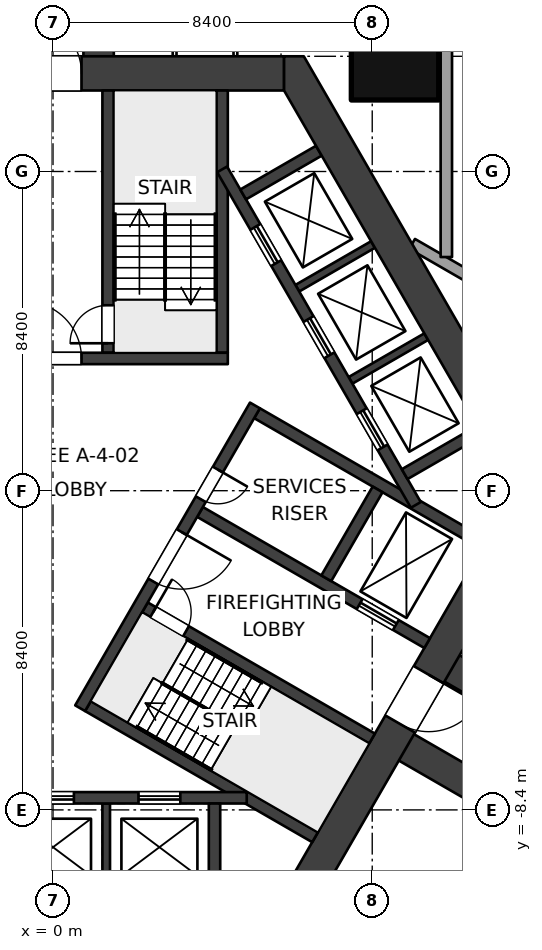
"""IFC4 building model, lengths in metres.
Left out: names, types, materials, properties, quantities, classifications, styles, units other than length and angle.
Written with IfcOpenShell. Run it as: python <this file> out.ifc"""

import sys

from ifc_helpers import new_model, si_unit, direction, frame, frame_2d, origin, origin_2d, place, context, subcontext, project, spatial, polyline, rectangle, outline, extrude, element, fill, save


model = new_model("IFC4")
c1 = context("Model", 3, precision=1e-05, world=origin(), true_north=direction((0.0, 1.0)))
c2 = subcontext(c1, "Body", "Model", "MODEL_VIEW")
j1 = project(units=[si_unit("LENGTHUNIT", "METRE"), si_unit("PLANEANGLEUNIT", "RADIAN")], contexts=[c1])
p1 = place(None, origin())
s1 = spatial("IfcSite", under=j1, at=p1, CompositionType="ELEMENT")
p2 = place(p1, origin())
s2 = spatial("IfcBuilding", under=s1, at=p2, CompositionType="ELEMENT")
p3 = place(p2, origin())
s3 = spatial("IfcBuildingStorey", under=s2, at=p3, CompositionType="ELEMENT", Elevation=0.0)
p4 = place(p3, frame((9.0, 11.432, 0.0), z_axis=(0.0, 0.0, 1.0), x_axis=(1.0, 0.0, 0.0)))
e1 = element("IfcColumn", 1, at=p4, inside=s3, PredefinedType="COLUMN", context=c2, shape_type="SweptSolid", body=[
    extrude(rectangle(XDim=2.3, YDim=2.3, at=origin_2d()), origin(), (0.0, 0.0, 1.0), 6.0),
])
p5 = place(p3, frame((-6.08, 10.981, 0.0), z_axis=(0.0, 0.0, 1.0), x_axis=(1.0, 0.0, 0.0)))
e2 = element("IfcWall", 2, at=p5, inside=s3, PredefinedType="SHEAR", context=c2, shape_type="SweptSolid", body=[
    extrude(rectangle(XDim=12.161, YDim=0.9, at=frame_2d((6.08, 0.0))), origin(), (0.0, 0.0, 1.0), 6.0),
])
p6 = place(p5, frame((5.33, 0.0, 0.0)))
e3 = element("IfcOpeningElement", 3, at=p6, cuts=e2, PredefinedType="OPENING", context=c2, shape_type="SweptSolid", body=[
    extrude(rectangle(XDim=1.5, YDim=2.1, at=frame_2d((0.75, 1.05))), frame((0.0, 0.46, 0.0), z_axis=(0.0, -1.0, 0.0), x_axis=(1.0, 0.0, 0.0)), (0.0, 0.0, 1.0), 0.92),
])
p7 = place(p3, frame((12.551, -0.225, 0.0), z_axis=(0.0, 0.0, 1.0), x_axis=(-0.499997612506, -0.8660267822, 0.0)))
e4 = element("IfcWall", 4, at=p7, inside=s3, PredefinedType="SHEAR", context=c2, shape_type="SweptSolid", body=[
    extrude(rectangle(XDim=12.161, YDim=0.9, at=frame_2d((6.08, 0.0))), origin(), (0.0, 0.0, 1.0), 6.0),
])
p8 = place(p7, frame((5.33, 0.0, 0.0)))
e5 = element("IfcOpeningElement", 5, at=p8, cuts=e4, PredefinedType="OPENING", context=c2, shape_type="SweptSolid", body=[
    extrude(rectangle(XDim=1.5, YDim=2.1, at=frame_2d((0.75, 1.05))), frame((0.0, 0.46, 0.0), z_axis=(0.0, -1.0, 0.0), x_axis=(1.0, 0.0, 0.0)), (0.0, 0.0, 1.0), 0.92),
])
p9 = place(p3, origin())
e6 = element("IfcWall", 6, at=p9, inside=s3, PredefinedType="SHEAR", context=c2, shape_type="SweptSolid", body=[
    extrude(outline(polyline([(13.2, 0.0), (6.6, 11.432), (6.08, 11.432), (6.08, 10.531), (12.161, 0.0), (12.94, -0.45), (13.2, 0.0)])), origin(), (0.0, 0.0, 1.0), 6.0),
])
p10 = place(p3, frame((-4.6, 3.48, 0.0), z_axis=(0.0, 0.0, 1.0), x_axis=(1.0, 0.0, 0.0)))
e7 = element("IfcWall", 7, at=p10, inside=s3, PredefinedType="SHEAR", context=c2, shape_type="SweptSolid", body=[
    extrude(rectangle(XDim=9.2, YDim=0.3, at=frame_2d((4.6, 0.0))), origin(), (0.0, 0.0, 1.0), 6.0),
])
p11 = place(p10, frame((3.85, 0.0, 0.0)))
e8 = element("IfcOpeningElement", 8, at=p11, cuts=e7, PredefinedType="OPENING", context=c2, shape_type="SweptSolid", body=[
    extrude(rectangle(XDim=1.5, YDim=2.1, at=frame_2d((0.75, 1.05))), frame((0.0, 0.16, 0.0), z_axis=(0.0, -1.0, 0.0), x_axis=(1.0, 0.0, 0.0)), (0.0, 0.0, 1.0), 0.32),
])
p12 = place(p10, frame((1.95, 0.0, 0.0)))
e9 = element("IfcOpeningElement", 9, at=p12, cuts=e7, PredefinedType="OPENING", context=c2, shape_type="SweptSolid", body=[
    extrude(rectangle(XDim=0.9, YDim=2.1, at=frame_2d((0.45, 1.05))), frame((0.0, 0.16, 0.0), z_axis=(0.0, -1.0, 0.0), x_axis=(1.0, 0.0, 0.0)), (0.0, 0.0, 1.0), 0.32),
])
p13 = place(p3, frame((1.45, 3.63, 0.0), z_axis=(0.0, 0.0, 1.0), x_axis=(0.0, 1.0, 0.0)))
e10 = element("IfcWall", 10, at=p13, inside=s3, PredefinedType="SHEAR", context=c2, shape_type="SweptSolid", body=[
    extrude(rectangle(XDim=6.902, YDim=0.3, at=frame_2d((3.451, 0.0))), origin(), (0.0, 0.0, 1.0), 6.0),
])
p14 = place(p13, frame((0.25, 0.0, 0.0)))
e11 = element("IfcOpeningElement", 11, at=p14, cuts=e10, PredefinedType="OPENING", context=c2, shape_type="SweptSolid", body=[
    extrude(rectangle(XDim=1.0, YDim=2.1, at=frame_2d((0.5, 1.05))), frame((0.0, 0.16, 0.0), z_axis=(0.0, -1.0, 0.0), x_axis=(1.0, 0.0, 0.0)), (0.0, 0.0, 1.0), 0.32),
])
p15 = place(p3, frame((4.45, 3.63, 0.0), z_axis=(0.0, 0.0, 1.0), x_axis=(0.0, 1.0, 0.0)))
e12 = element("IfcWall", 12, at=p15, inside=s3, PredefinedType="SHEAR", context=c2, shape_type="SweptSolid", body=[
    extrude(rectangle(XDim=6.902, YDim=0.3, at=frame_2d((3.451, 0.0))), origin(), (0.0, 0.0, 1.0), 6.0),
])
p16 = place(p3, frame((5.314, 2.244, 0.0), z_axis=(0.0, 0.0, 1.0), x_axis=(-0.499995050369, -0.866028261437, 0.0)))
e13 = element("IfcWall", 13, at=p16, inside=s3, PredefinedType="SHEAR", context=c2, shape_type="SweptSolid", body=[
    extrude(rectangle(XDim=9.2, YDim=0.3, at=frame_2d((4.6, 0.0))), origin(), (0.0, 0.0, 1.0), 6.0),
])
p17 = place(p16, frame((3.85, 0.0, 0.0)))
e14 = element("IfcOpeningElement", 14, at=p17, cuts=e13, PredefinedType="OPENING", context=c2, shape_type="SweptSolid", body=[
    extrude(rectangle(XDim=1.5, YDim=2.1, at=frame_2d((0.75, 1.05))), frame((0.0, 0.16, 0.0), z_axis=(0.0, -1.0, 0.0), x_axis=(1.0, 0.0, 0.0)), (0.0, 0.0, 1.0), 0.32),
])
p18 = place(p16, frame((1.95, 0.0, 0.0)))
e15 = element("IfcOpeningElement", 15, at=p18, cuts=e13, PredefinedType="OPENING", context=c2, shape_type="SweptSolid", body=[
    extrude(rectangle(XDim=0.9, YDim=2.1, at=frame_2d((0.45, 1.05))), frame((0.0, 0.16, 0.0), z_axis=(0.0, -1.0, 0.0), x_axis=(1.0, 0.0, 0.0)), (0.0, 0.0, 1.0), 0.32),
])
p19 = place(p3, frame((2.419, -3.071, 0.0), z_axis=(0.0, 0.0, 1.0), x_axis=(0.86602711848, -0.499997030048, 0.0)))
e16 = element("IfcWall", 16, at=p19, inside=s3, PredefinedType="SHEAR", context=c2, shape_type="SweptSolid", body=[
    extrude(rectangle(XDim=6.901, YDim=0.3, at=frame_2d((3.451, 0.0))), origin(), (0.0, 0.0, 1.0), 6.0),
])
p20 = place(p19, frame((0.25, 0.0, 0.0)))
e17 = element("IfcOpeningElement", 17, at=p20, cuts=e16, PredefinedType="OPENING", context=c2, shape_type="SweptSolid", body=[
    extrude(rectangle(XDim=1.0, YDim=2.1, at=frame_2d((0.5, 1.05))), frame((0.0, 0.16, 0.0), z_axis=(0.0, -1.0, 0.0), x_axis=(1.0, 0.0, 0.0)), (0.0, 0.0, 1.0), 0.32),
])
p21 = place(p3, frame((0.919, -5.669, 0.0), z_axis=(0.0, 0.0, 1.0), x_axis=(0.866011800373, -0.500023561059, 0.0)))
e18 = element("IfcWall", 18, at=p21, inside=s3, PredefinedType="SHEAR", context=c2, shape_type="SweptSolid", body=[
    extrude(rectangle(XDim=6.902, YDim=0.3, at=frame_2d((3.451, 0.0))), origin(), (0.0, 0.0, 1.0), 6.0),
])
p22 = place(p3, frame((3.869, -0.559, 0.0), z_axis=(0.0, 0.0, 1.0), x_axis=(0.86602711848, -0.499997030048, 0.0)))
e19 = element("IfcWall", 19, at=p22, inside=s3, PredefinedType="SHEAR", context=c2, shape_type="SweptSolid", body=[
    extrude(rectangle(XDim=6.901, YDim=0.3, at=frame_2d((3.451, 0.0))), origin(), (0.0, 0.0, 1.0), 6.0),
])
p23 = place(p22, frame((4.85, 0.0, 0.0)))
e20 = element("IfcOpeningElement", 20, at=p23, cuts=e19, PredefinedType="OPENING", context=c2, shape_type="SweptSolid", body=[
    extrude(rectangle(XDim=1.1, YDim=2.1, at=frame_2d((0.55, 1.05))), frame((0.0, 0.16, 0.0), z_axis=(0.0, -1.0, 0.0), x_axis=(1.0, 0.0, 0.0)), (0.0, 0.0, 1.0), 0.32),
])
p24 = place(p3, frame((5.369, 2.039, 0.0), z_axis=(0.0, 0.0, 1.0), x_axis=(0.86602711848, -0.499997030048, 0.0)))
e21 = element("IfcWall", 21, at=p24, inside=s3, PredefinedType="SHEAR", context=c2, shape_type="SweptSolid", body=[
    extrude(rectangle(XDim=6.901, YDim=0.3, at=frame_2d((3.451, 0.0))), origin(), (0.0, 0.0, 1.0), 6.0),
])
p25 = place(p3, frame((8.541, 0.034, 0.0), z_axis=(0.0, 0.0, 1.0), x_axis=(-0.50000943426, -0.866019956843, 0.0)))
e22 = element("IfcWall", 22, at=p25, inside=s3, PredefinedType="SHEAR", context=c2, shape_type="SweptSolid", body=[
    extrude(rectangle(XDim=2.7, YDim=0.3, at=frame_2d((1.35, 0.0))), origin(), (0.0, 0.0, 1.0), 6.0),
])
p26 = place(p3, frame((5.098, -8.082, 0.0), z_axis=(0.0, 0.0, 1.0), x_axis=(-1.0, 0.0, 0.0)))
e23 = element("IfcWall", 23, at=p26, inside=s3, PredefinedType="SHEAR", context=c2, shape_type="SweptSolid", body=[
    extrude(rectangle(XDim=10.195, YDim=0.3, at=frame_2d((5.098, 0.0))), origin(), (0.0, 0.0, 1.0), 6.0),
])
p27 = place(p26, frame((1.748, 0.0, 0.0)))
e24 = element("IfcOpeningElement", 24, at=p27, cuts=e23, PredefinedType="OPENING", context=c2, shape_type="SweptSolid", body=[
    extrude(rectangle(XDim=1.1, YDim=2.1, at=frame_2d((0.55, 1.05))), frame((0.0, 0.16, 0.0), z_axis=(0.0, -1.0, 0.0), x_axis=(1.0, 0.0, 0.0)), (0.0, 0.0, 1.0), 0.32),
])
p28 = place(p26, frame((4.548, 0.0, 0.0)))
e25 = element("IfcOpeningElement", 25, at=p28, cuts=e23, PredefinedType="OPENING", context=c2, shape_type="SweptSolid", body=[
    extrude(rectangle(XDim=1.1, YDim=2.1, at=frame_2d((0.55, 1.05))), frame((0.0, 0.16, 0.0), z_axis=(0.0, -1.0, 0.0), x_axis=(1.0, 0.0, 0.0)), (0.0, 0.0, 1.0), 0.32),
])
p29 = place(p26, frame((7.348, 0.0, 0.0)))
e26 = element("IfcOpeningElement", 26, at=p29, cuts=e23, PredefinedType="OPENING", context=c2, shape_type="SweptSolid", body=[
    extrude(rectangle(XDim=1.1, YDim=2.1, at=frame_2d((0.55, 1.05))), frame((0.0, 0.16, 0.0), z_axis=(0.0, -1.0, 0.0), x_axis=(1.0, 0.0, 0.0)), (0.0, 0.0, 1.0), 0.32),
])
p30 = place(p3, frame((4.25, -8.231, 0.0), z_axis=(0.0, 0.0, 1.0), x_axis=(0.0, -1.0, 0.0)))
e27 = element("IfcWall", 27, at=p30, inside=s3, PredefinedType="SHEAR", context=c2, shape_type="SweptSolid", body=[
    extrude(rectangle(XDim=2.3, YDim=0.3, at=frame_2d((1.15, 0.0))), origin(), (0.0, 0.0, 1.0), 6.0),
])
p31 = place(p3, frame((1.4, -8.231, 0.0), z_axis=(0.0, 0.0, 1.0), x_axis=(0.0, -1.0, 0.0)))
e28 = element("IfcWall", 28, at=p31, inside=s3, PredefinedType="SHEAR", context=c2, shape_type="SweptSolid", body=[
    extrude(rectangle(XDim=2.3, YDim=0.2, at=frame_2d((1.15, 0.0))), origin(), (0.0, 0.0, 1.0), 6.0),
])
p32 = place(p3, frame((4.45, 8.455, 0.0), z_axis=(0.0, 0.0, 1.0), x_axis=(0.500002290144, -0.866024081565, 0.0)))
e29 = element("IfcWall", 29, at=p32, inside=s3, PredefinedType="SHEAR", context=c2, shape_type="SweptSolid", body=[
    extrude(rectangle(XDim=10.195, YDim=0.3, at=frame_2d((5.098, 0.0))), origin(), (0.0, 0.0, 1.0), 6.0),
])
p33 = place(p32, frame((1.748, 0.0, 0.0)))
e30 = element("IfcOpeningElement", 30, at=p33, cuts=e29, PredefinedType="OPENING", context=c2, shape_type="SweptSolid", body=[
    extrude(rectangle(XDim=1.1, YDim=2.1, at=frame_2d((0.55, 1.05))), frame((0.0, 0.16, 0.0), z_axis=(0.0, -1.0, 0.0), x_axis=(1.0, 0.0, 0.0)), (0.0, 0.0, 1.0), 0.32),
])
p34 = place(p32, frame((4.548, 0.0, 0.0)))
e31 = element("IfcOpeningElement", 31, at=p34, cuts=e29, PredefinedType="OPENING", context=c2, shape_type="SweptSolid", body=[
    extrude(rectangle(XDim=1.1, YDim=2.1, at=frame_2d((0.55, 1.05))), frame((0.0, 0.16, 0.0), z_axis=(0.0, -1.0, 0.0), x_axis=(1.0, 0.0, 0.0)), (0.0, 0.0, 1.0), 0.32),
])
p35 = place(p32, frame((7.348, 0.0, 0.0)))
e32 = element("IfcOpeningElement", 32, at=p35, cuts=e29, PredefinedType="OPENING", context=c2, shape_type="SweptSolid", body=[
    extrude(rectangle(XDim=1.1, YDim=2.1, at=frame_2d((0.55, 1.05))), frame((0.0, 0.16, 0.0), z_axis=(0.0, -1.0, 0.0), x_axis=(1.0, 0.0, 0.0)), (0.0, 0.0, 1.0), 0.32),
])
for number, where, z_axis, x_axis in (
    (33, (5.004, 7.796, 0.0), (0.0, 0.0, 1.0), (0.866, 0.5, 0.0)),
    (34, (9.254, 0.435, 0.0), (0.0, 0.0, 1.0), (0.866, 0.5, 0.0)),
):
    element("IfcWall", number, at=place(p3, frame(where, z_axis=z_axis, x_axis=x_axis)), inside=s3, PredefinedType="SHEAR", context=c2, shape_type="SweptSolid", body=[
        extrude(rectangle(XDim=2.3, YDim=0.3, at=frame_2d((1.15, 0.0))), origin(), (0.0, 0.0, 1.0), 6.0),
    ])
for number, where, z_axis, x_axis in (
    (35, (6.429, 5.328, 0.0), (0.0, 0.0, 1.0), (0.866, 0.5, 0.0)),
    (36, (7.829, 2.903, 0.0), (0.0, 0.0, 1.0), (0.866, 0.5, 0.0)),
):
    element("IfcWall", number, at=place(p3, frame(where, z_axis=z_axis, x_axis=x_axis)), inside=s3, PredefinedType="SHEAR", context=c2, shape_type="SweptSolid", body=[
        extrude(rectangle(XDim=2.3, YDim=0.2, at=frame_2d((1.15, 0.0))), origin(), (0.0, 0.0, 1.0), 6.0),
    ])
p36 = place(p3, frame((1.2, 10.981, 0.0), z_axis=(0.0, 0.0, 1.0), x_axis=(0.0, 1.0, 0.0)))
e37 = element("IfcWall", 37, at=p36, inside=s3, PredefinedType="SHEAR", context=c2, shape_type="SweptSolid", body=[
    extrude(rectangle(XDim=36.75, YDim=0.8, at=frame_2d((18.375, 0.0))), origin(), (0.0, 0.0, 1.0), 6.0),
])
p37 = place(p36, frame((10.0, 0.0, 0.0)))
e38 = element("IfcOpeningElement", 38, at=p37, cuts=e37, PredefinedType="OPENING", context=c2, shape_type="SweptSolid", body=[
    extrude(rectangle(XDim=1.0, YDim=2.1, at=frame_2d((0.5, 1.05))), frame((0.0, 0.41, 0.0), z_axis=(0.0, -1.0, 0.0), x_axis=(1.0, 0.0, 0.0)), (0.0, 0.0, 1.0), 0.82),
])
p38 = place(p36, frame((2.75, 0.0, 0.0)))
e39 = element("IfcOpeningElement", 39, at=p38, cuts=e37, PredefinedType="OPENING", context=c2, shape_type="SweptSolid", body=[
    extrude(rectangle(XDim=1.2, YDim=2.1, at=frame_2d((0.6, 1.05))), frame((0.0, 0.41, 0.0), z_axis=(0.0, -1.0, 0.0), x_axis=(1.0, 0.0, 0.0)), (0.0, 0.0, 1.0), 0.82),
])
p39 = place(p36, frame((7.35, 0.0, 0.0)))
e40 = element("IfcOpeningElement", 40, at=p39, cuts=e37, PredefinedType="OPENING", context=c2, shape_type="SweptSolid", body=[
    extrude(rectangle(XDim=1.2, YDim=2.1, at=frame_2d((0.6, 1.05))), frame((0.0, 0.41, 0.0), z_axis=(0.0, -1.0, 0.0), x_axis=(1.0, 0.0, 0.0)), (0.0, 0.0, 1.0), 0.82),
])
p40 = place(p3, frame((10.11, -4.451, 0.0), z_axis=(0.0, 0.0, 1.0), x_axis=(0.866025284237, -0.500000207062, 0.0)))
e41 = element("IfcWall", 41, at=p40, inside=s3, PredefinedType="SHEAR", context=c2, shape_type="SweptSolid", body=[
    extrude(rectangle(XDim=36.75, YDim=0.8, at=frame_2d((18.375, 0.0))), origin(), (0.0, 0.0, 1.0), 6.0),
])
p41 = place(p40, frame((2.85, 0.0, 0.0)))
e42 = element("IfcOpeningElement", 42, at=p41, cuts=e41, PredefinedType="OPENING", context=c2, shape_type="SweptSolid", body=[
    extrude(rectangle(XDim=1.2, YDim=2.1, at=frame_2d((0.6, 1.05))), frame((0.0, 0.41, 0.0), z_axis=(0.0, -1.0, 0.0), x_axis=(1.0, 0.0, 0.0)), (0.0, 0.0, 1.0), 0.82),
])
p42 = place(p3, frame((8.91, -6.53, 0.0), z_axis=(0.0, 0.0, 1.0), x_axis=(0.866025284237, -0.500000207062, 0.0)))
e43 = element("IfcWall", 43, at=p42, inside=s3, PredefinedType="SHEAR", context=c2, shape_type="SweptSolid", body=[
    extrude(rectangle(XDim=36.75, YDim=0.8, at=frame_2d((18.375, 0.0))), origin(), (0.0, 0.0, 1.0), 6.0),
])
p43 = place(p42, frame((10.0, 0.0, 0.0)))
e44 = element("IfcOpeningElement", 44, at=p43, cuts=e43, PredefinedType="OPENING", context=c2, shape_type="SweptSolid", body=[
    extrude(rectangle(XDim=1.0, YDim=2.1, at=frame_2d((0.5, 1.05))), frame((0.0, 0.41, 0.0), z_axis=(0.0, -1.0, 0.0), x_axis=(1.0, 0.0, 0.0)), (0.0, 0.0, 1.0), 0.82),
])
p44 = place(p42, frame((2.85, 0.0, 0.0)))
e45 = element("IfcOpeningElement", 45, at=p44, cuts=e43, PredefinedType="OPENING", context=c2, shape_type="SweptSolid", body=[
    extrude(rectangle(XDim=1.2, YDim=2.1, at=frame_2d((0.6, 1.05))), frame((0.0, 0.41, 0.0), z_axis=(0.0, -1.0, 0.0), x_axis=(1.0, 0.0, 0.0)), (0.0, 0.0, 1.0), 0.82),
])
p45 = place(p3, frame((3.2, 11.432, 0.0), z_axis=(0.0, 0.0, 1.0), x_axis=(0.0, 1.0, 0.0)))
e46 = element("IfcWall", 46, at=p45, inside=s3, PredefinedType="PARTITIONING", context=c2, shape_type="SweptSolid", body=[
    extrude(rectangle(XDim=5.6, YDim=0.1, at=frame_2d((2.8, 0.0))), origin(), (0.0, 0.0, 1.0), 5.7),
])
p46 = place(p45, frame((1.125, 0.0, 0.0)))
e47 = element("IfcOpeningElement", 47, at=p46, cuts=e46, PredefinedType="OPENING", context=c2, shape_type="SweptSolid", body=[
    extrude(rectangle(XDim=0.9, YDim=2.1, at=frame_2d((0.45, 1.05))), frame((0.0, 0.06, 0.0), z_axis=(0.0, -1.0, 0.0), x_axis=(1.0, 0.0, 0.0)), (0.0, 0.0, 1.0), 0.12),
])
p47 = place(p45, frame((3.775, 0.0, 0.0)))
e48 = element("IfcOpeningElement", 48, at=p47, cuts=e46, PredefinedType="OPENING", context=c2, shape_type="SweptSolid", body=[
    extrude(rectangle(XDim=0.9, YDim=2.1, at=frame_2d((0.45, 1.05))), frame((0.0, 0.06, 0.0), z_axis=(0.0, -1.0, 0.0), x_axis=(1.0, 0.0, 0.0)), (0.0, 0.0, 1.0), 0.12),
])
p48 = place(p3, frame((4.8, 11.432, 0.0), z_axis=(0.0, 0.0, 1.0), x_axis=(0.0, 1.0, 0.0)))
e49 = element("IfcWall", 49, at=p48, inside=s3, PredefinedType="PARTITIONING", context=c2, shape_type="SweptSolid", body=[
    extrude(rectangle(XDim=5.55, YDim=0.1, at=frame_2d((2.775, 0.0))), origin(), (0.0, 0.0, 1.0), 5.7),
])
p49 = place(p3, frame((10.35, 6.149, 0.0), z_axis=(0.0, 0.0, 1.0), x_axis=(0.0, 1.0, 0.0)))
e50 = element("IfcWall", 50, at=p49, inside=s3, PredefinedType="SOLIDWALL", context=c2, shape_type="SweptSolid", body=[
    extrude(rectangle(XDim=41.883, YDim=0.3, at=frame_2d((20.941, 0.0))), origin(), (0.0, 0.0, 1.0), 5.7),
])
p50 = place(p49, frame((25.383, 0.0, 0.0)))
e51 = element("IfcOpeningElement", 51, at=p50, cuts=e50, PredefinedType="OPENING", context=c2, shape_type="SweptSolid", body=[
    extrude(rectangle(XDim=1.8, YDim=2.4, at=frame_2d((0.9, 1.2))), frame((0.0, 0.16, 0.0), z_axis=(0.0, -1.0, 0.0), x_axis=(1.0, 0.0, 0.0)), (0.0, 0.0, 1.0), 0.32),
])
p51 = place(p3, frame((9.45, 6.495, 0.0), z_axis=(0.0, 0.0, 1.0), x_axis=(0.866025301493, -0.500000177174, 0.0)))
e52 = element("IfcWall", 52, at=p51, inside=s3, PredefinedType="SOLIDWALL", context=c2, shape_type="SweptSolid", body=[
    extrude(rectangle(XDim=43.095, YDim=0.3, at=frame_2d((21.548, 0.0))), origin(), (0.0, 0.0, 1.0), 5.7),
])
p52 = place(p51, frame((26.595, 0.0, 0.0)))
e53 = element("IfcOpeningElement", 53, at=p52, cuts=e52, PredefinedType="OPENING", context=c2, shape_type="SweptSolid", body=[
    extrude(rectangle(XDim=1.8, YDim=2.4, at=frame_2d((0.9, 1.2))), frame((0.0, 0.16, 0.0), z_axis=(0.0, -1.0, 0.0), x_axis=(1.0, 0.0, 0.0)), (0.0, 0.0, 1.0), 0.32),
])
p53 = place(p27, origin())
e54 = element("IfcDoor", 54, at=p53, inside=s3, OperationType="DOUBLE_DOOR_SLIDING", PredefinedType="DOOR", context=c2, shape_type="SweptSolid", body=[
    extrude(rectangle(XDim=1.1, YDim=2.1, at=frame_2d((0.55, 1.05))), frame((0.0, 0.025, 0.0), z_axis=(0.0, -1.0, 0.0), x_axis=(1.0, 0.0, 0.0)), (0.0, 0.0, 1.0), 0.05),
])
fill(e24, e54)
p54 = place(p28, origin())
e55 = element("IfcDoor", 55, at=p54, inside=s3, OperationType="DOUBLE_DOOR_SLIDING", PredefinedType="DOOR", context=c2, shape_type="SweptSolid", body=[
    extrude(rectangle(XDim=1.1, YDim=2.1, at=frame_2d((0.55, 1.05))), frame((0.0, 0.025, 0.0), z_axis=(0.0, -1.0, 0.0), x_axis=(1.0, 0.0, 0.0)), (0.0, 0.0, 1.0), 0.05),
])
fill(e25, e55)
p55 = place(p33, origin())
e56 = element("IfcDoor", 56, at=p55, inside=s3, OperationType="DOUBLE_DOOR_SLIDING", PredefinedType="DOOR", context=c2, shape_type="SweptSolid", body=[
    extrude(rectangle(XDim=1.1, YDim=2.1, at=frame_2d((0.55, 1.05))), frame((0.0, 0.025, 0.0), z_axis=(0.0, -1.0, 0.0), x_axis=(1.0, 0.0, 0.0)), (0.0, 0.0, 1.0), 0.05),
])
fill(e30, e56)
p56 = place(p34, origin())
e57 = element("IfcDoor", 57, at=p56, inside=s3, OperationType="DOUBLE_DOOR_SLIDING", PredefinedType="DOOR", context=c2, shape_type="SweptSolid", body=[
    extrude(rectangle(XDim=1.1, YDim=2.1, at=frame_2d((0.55, 1.05))), frame((0.0, 0.025, 0.0), z_axis=(0.0, -1.0, 0.0), x_axis=(1.0, 0.0, 0.0)), (0.0, 0.0, 1.0), 0.05),
])
fill(e31, e57)
p57 = place(p35, origin())
e58 = element("IfcDoor", 58, at=p57, inside=s3, OperationType="DOUBLE_DOOR_SLIDING", PredefinedType="DOOR", context=c2, shape_type="SweptSolid", body=[
    extrude(rectangle(XDim=1.1, YDim=2.1, at=frame_2d((0.55, 1.05))), frame((0.0, 0.025, 0.0), z_axis=(0.0, -1.0, 0.0), x_axis=(1.0, 0.0, 0.0)), (0.0, 0.0, 1.0), 0.05),
])
fill(e32, e58)
p58 = place(p23, origin())
e59 = element("IfcDoor", 59, at=p58, inside=s3, OperationType="DOUBLE_DOOR_SLIDING", PredefinedType="DOOR", context=c2, shape_type="SweptSolid", body=[
    extrude(rectangle(XDim=1.1, YDim=2.1, at=frame_2d((0.55, 1.05))), frame((0.0, 0.025, 0.0), z_axis=(0.0, -1.0, 0.0), x_axis=(1.0, 0.0, 0.0)), (0.0, 0.0, 1.0), 0.05),
])
fill(e20, e59)
p59 = place(p11, origin())
e60 = element("IfcDoor", 60, at=p59, inside=s3, OperationType="DOUBLE_DOOR_DOUBLE_SWING", PredefinedType="DOOR", context=c2, shape_type="SweptSolid", body=[
    extrude(rectangle(XDim=1.5, YDim=2.1, at=frame_2d((0.75, 1.05))), frame((0.0, 0.025, 0.0), z_axis=(0.0, -1.0, 0.0), x_axis=(1.0, 0.0, 0.0)), (0.0, 0.0, 1.0), 0.05),
])
fill(e8, e60)
p60 = place(p14, origin())
e61 = element("IfcDoor", 61, at=p60, inside=s3, OperationType="SINGLE_SWING_LEFT", PredefinedType="DOOR", context=c2, shape_type="SweptSolid", body=[
    extrude(rectangle(XDim=1.0, YDim=2.1, at=frame_2d((0.5, 1.05))), frame((0.0, 0.025, 0.0), z_axis=(0.0, -1.0, 0.0), x_axis=(1.0, 0.0, 0.0)), (0.0, 0.0, 1.0), 0.05),
])
fill(e11, e61)
p61 = place(p6, origin())
e62 = element("IfcDoor", 62, at=p61, inside=s3, OperationType="DOUBLE_DOOR_DOUBLE_SWING", PredefinedType="DOOR", context=c2, shape_type="SweptSolid", body=[
    extrude(rectangle(XDim=1.5, YDim=2.1, at=frame_2d((0.75, 1.05))), frame((0.0, 0.025, 0.0), z_axis=(0.0, -1.0, 0.0), x_axis=(1.0, 0.0, 0.0)), (0.0, 0.0, 1.0), 0.05),
])
fill(e3, e62)
p62 = place(p17, origin())
e63 = element("IfcDoor", 63, at=p62, inside=s3, OperationType="DOUBLE_DOOR_DOUBLE_SWING", PredefinedType="DOOR", context=c2, shape_type="SweptSolid", body=[
    extrude(rectangle(XDim=1.5, YDim=2.1, at=frame_2d((0.75, 1.05))), frame((0.0, 0.025, 0.0), z_axis=(0.0, -1.0, 0.0), x_axis=(1.0, 0.0, 0.0)), (0.0, 0.0, 1.0), 0.05),
])
fill(e14, e63)
p63 = place(p18, origin())
e64 = element("IfcDoor", 64, at=p63, inside=s3, OperationType="SINGLE_SWING_LEFT", PredefinedType="DOOR", context=c2, shape_type="SweptSolid", body=[
    extrude(rectangle(XDim=0.9, YDim=2.1, at=frame_2d((0.45, 1.05))), frame((0.0, 0.025, 0.0), z_axis=(0.0, -1.0, 0.0), x_axis=(1.0, 0.0, 0.0)), (0.0, 0.0, 1.0), 0.05),
])
fill(e15, e64)
p64 = place(p20, origin())
e65 = element("IfcDoor", 65, at=p64, inside=s3, OperationType="SINGLE_SWING_LEFT", PredefinedType="DOOR", context=c2, shape_type="SweptSolid", body=[
    extrude(rectangle(XDim=1.0, YDim=2.1, at=frame_2d((0.5, 1.05))), frame((0.0, 0.025, 0.0), z_axis=(0.0, -1.0, 0.0), x_axis=(1.0, 0.0, 0.0)), (0.0, 0.0, 1.0), 0.05),
])
fill(e17, e65)
p65 = place(p8, origin())
e66 = element("IfcDoor", 66, at=p65, inside=s3, OperationType="DOUBLE_DOOR_DOUBLE_SWING", PredefinedType="DOOR", context=c2, shape_type="SweptSolid", body=[
    extrude(rectangle(XDim=1.5, YDim=2.1, at=frame_2d((0.75, 1.05))), frame((0.0, 0.025, 0.0), z_axis=(0.0, -1.0, 0.0), x_axis=(1.0, 0.0, 0.0)), (0.0, 0.0, 1.0), 0.05),
])
fill(e5, e66)
save(model, sys.argv[1])
